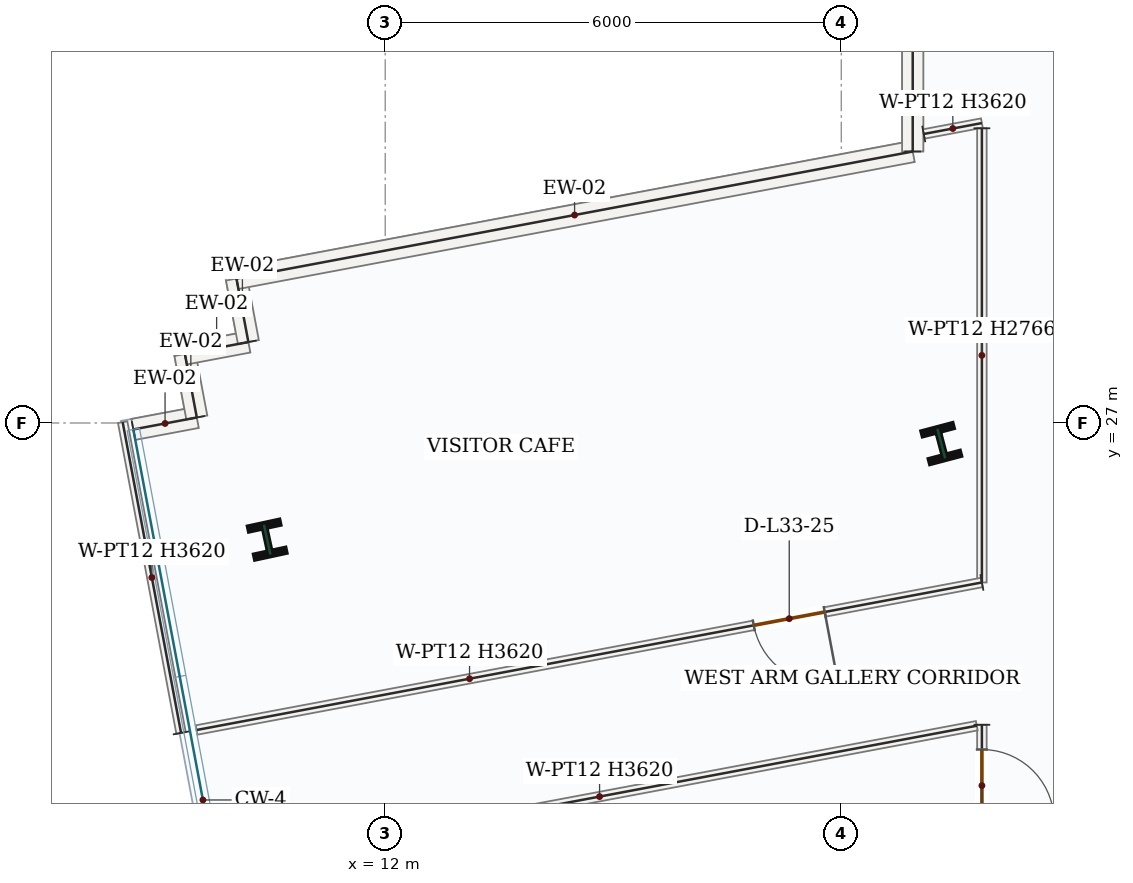
"""IFC4 building model, lengths in metres.
Left out: names, types, materials, properties, quantities, classifications, styles, units other than length and angle.
Written with IfcOpenShell. Run it as: python <this file> out.ifc"""

import sys

from ifc_helpers import new_model, si_unit, direction, frame, frame_2d, origin, origin_2d, place, context, subcontext, project, spatial, rectangle, i_section, extrude, source, transform, mapped, element, fill, save


model = new_model("IFC4")
c1 = context("Model", 3, precision=1e-05, world=origin(), true_north=direction((0.0, 1.0)))
c2 = subcontext(c1, "Body", "Model", "MODEL_VIEW")
j1 = project(units=[si_unit("LENGTHUNIT", "METRE"), si_unit("PLANEANGLEUNIT", "RADIAN")], contexts=[c1])
p1 = place(None, origin())
s1 = spatial("IfcSite", under=j1, at=p1, CompositionType="ELEMENT")
p2 = place(p1, origin())
s2 = spatial("IfcBuilding", under=s1, at=p2, CompositionType="ELEMENT")
p3 = place(p2, frame((0.0, 0.0, 147.3)))
s3 = spatial("IfcBuildingStorey", under=s2, at=p3, CompositionType="ELEMENT", Elevation=147.3)
m1 = source(origin(), c2, "Body", "SweptSolid", [
    extrude(i_section(OverallWidth=0.412, OverallDepth=0.435, WebThickness=0.036, FlangeThickness=0.057, FilletRadius=0.018, at=origin_2d()), origin(), (0.0, 0.0, 1.0), 3.9),
])
for number, where, z_axis, x_axis in (
    (1, (19.316, 26.729, 0.0), (0.0, 0.0, 1.0), (0.967, 0.255, 0.0)),
    (2, (10.447, 25.465, 0.0), (0.0, 0.0, 1.0), (0.977, 0.211, 0.0)),
):
    element("IfcColumn", number, at=place(p3, frame(where, z_axis=z_axis, x_axis=x_axis)), inside=s3, PredefinedType="COLUMN", context=c2, shape_type="MappedRepresentation", body=[
        mapped(m1, transform((0.0, 0.0, 0.0), x_axis=(1.0, 0.0, 0.0), y_axis=(0.0, 1.0, 0.0), z_axis=(0.0, 0.0, 1.0), scale=1.0)),
    ])
m2 = source(origin(), c2, "Body", "SweptSolid", [
    extrude(rectangle(XDim=0.85, YDim=0.28, at=frame_2d((0.425, 0.0))), origin(), (0.0, 0.0, 1.0), 3.62),
])
for number, where, z_axis, x_axis in (
    (3, (8.686, 26.915, 0.0), (0.0, 0.0, 1.0), (0.983, 0.185, 0.0)),
    (4, (9.521, 27.072, 0.0), (0.0, 0.0, 1.0), (-0.185, 0.983, 0.0)),
):
    element("IfcWall", number, at=place(p3, frame(where, z_axis=z_axis, x_axis=x_axis)), inside=s3, PredefinedType="SOLIDWALL", context=c2, shape_type="MappedRepresentation", body=[
        mapped(m2, transform((0.0, 0.0, 0.0), x_axis=(1.0, 0.0, 0.0), y_axis=(0.0, 1.0, 0.0), z_axis=(0.0, 0.0, 1.0), scale=1.0)),
    ])
m3 = source(origin(), c2, "Body", "SweptSolid", [
    extrude(rectangle(XDim=0.85, YDim=0.28, at=frame_2d((0.425, 0.0))), origin(), (0.0, 0.0, 1.0), 3.62),
])
p4 = place(p3, frame((9.365, 27.908, 0.0), z_axis=(0.0, 0.0, 1.0), x_axis=(0.982790785128, 0.184722149909, 0.0)))
e5 = element("IfcWall", 5, at=p4, inside=s3, PredefinedType="SOLIDWALL", context=c2, shape_type="MappedRepresentation", body=[
    mapped(m3, transform((0.0, 0.0, 0.0), x_axis=(1.0, 0.0, 0.0), y_axis=(0.0, 1.0, 0.0), z_axis=(0.0, 0.0, 1.0), scale=1.0)),
])
p5 = place(p3, frame((10.2, 28.065, 0.0), z_axis=(0.0, 0.0, 1.0), x_axis=(-0.184392582027, 0.982852672425, 0.0)))
e6 = element("IfcWall", 6, at=p5, inside=s3, PredefinedType="SOLIDWALL", context=c2, shape_type="MappedRepresentation", body=[
    mapped(m2, transform((0.0, 0.0, 0.0), x_axis=(1.0, 0.0, 0.0), y_axis=(0.0, 1.0, 0.0), z_axis=(0.0, 0.0, 1.0), scale=1.0)),
])
m4 = source(origin(), c2, "Body", "SweptSolid", [
    extrude(rectangle(XDim=9.052, YDim=0.28, at=frame_2d((4.526, 0.0))), origin(), (0.0, 0.0, 1.0), 3.62),
])
p6 = place(p3, frame((10.043, 28.9, 0.0), z_axis=(0.0, 0.0, 1.0), x_axis=(0.982808012228, 0.184630471755, 0.0)))
e7 = element("IfcWall", 7, at=p6, inside=s3, PredefinedType="SOLIDWALL", context=c2, shape_type="MappedRepresentation", body=[
    mapped(m4, transform((0.0, 0.0, 0.0), x_axis=(1.0, 0.0, 0.0), y_axis=(0.0, 1.0, 0.0), z_axis=(0.0, 0.0, 1.0), scale=1.0)),
])
m5 = source(origin(), c2, "Body", "SweptSolid", [
    extrude(rectangle(XDim=4.97, YDim=0.28, at=frame_2d((2.485, 0.0))), origin(), (0.0, 0.0, 1.0), 3.62),
])
p7 = place(p3, frame((18.94, 30.572, 0.0), z_axis=(0.0, 0.0, 1.0), x_axis=(0.0, 1.0, 0.0)))
e8 = element("IfcWall", 8, at=p7, inside=s3, PredefinedType="SOLIDWALL", context=c2, shape_type="MappedRepresentation", body=[
    mapped(m5, transform((0.0, 0.0, 0.0), x_axis=(1.0, 0.0, 0.0), y_axis=(0.0, 1.0, 0.0), z_axis=(0.0, 0.0, 1.0), scale=1.0)),
])
m6 = source(origin(), c2, "Body", "SweptSolid", [
    extrude(rectangle(XDim=4.16, YDim=0.125, at=frame_2d((2.08, 0.0))), origin(), (0.0, 0.0, 1.0), 3.62),
])
p8 = place(p3, frame((9.314, 22.923, 0.0), z_axis=(0.0, 0.0, 1.0), x_axis=(-0.184635785614, 0.982807013951, 0.0)))
e9 = element("IfcWall", 9, at=p8, inside=s3, PredefinedType="PARTITIONING", context=c2, shape_type="MappedRepresentation", body=[
    mapped(m6, transform((0.0, 0.0, 0.0), x_axis=(1.0, 0.0, 0.0), y_axis=(0.0, 1.0, 0.0), z_axis=(0.0, 0.0, 1.0), scale=1.0)),
])
m7 = source(origin(), c2, "Body", "SweptSolid", [
    extrude(rectangle(XDim=0.779, YDim=0.125, at=frame_2d((0.389, 0.0))), origin(), (0.0, 0.0, 1.0), 3.62),
])
p9 = place(p3, frame((19.085, 30.802, 0.0), z_axis=(0.0, 0.0, 1.0), x_axis=(0.982850878619, 0.184402143149, 0.0)))
e10 = element("IfcWall", 10, at=p9, inside=s3, PredefinedType="PARTITIONING", context=c2, shape_type="MappedRepresentation", body=[
    mapped(m7, transform((0.0, 0.0, 0.0), x_axis=(1.0, 0.0, 0.0), y_axis=(0.0, 1.0, 0.0), z_axis=(0.0, 0.0, 1.0), scale=1.0)),
])
m8 = source(origin(), c2, "Body", "SweptSolid", [
    extrude(rectangle(XDim=5.975, YDim=0.125, at=frame_2d((2.988, 0.0))), origin(), (0.0, 0.0, 1.0), 2.766),
])
p10 = place(p3, frame((19.85, 30.877, 0.0), z_axis=(0.0, 0.0, 1.0), x_axis=(0.0, -1.0, 0.0)))
e11 = element("IfcWall", 11, at=p10, inside=s3, PredefinedType="PARTITIONING", context=c2, shape_type="MappedRepresentation", body=[
    mapped(m8, transform((0.0, 0.0, 0.0), x_axis=(1.0, 0.0, 0.0), y_axis=(0.0, 1.0, 0.0), z_axis=(0.0, 0.0, 1.0), scale=1.0)),
])
p11 = place(p3, frame((19.85, 24.902, 0.0), z_axis=(0.0, 0.0, 1.0), x_axis=(-0.982804817995, -0.184647474194, 0.0)))
e12 = element("IfcWall", 12, at=p11, inside=s3, PredefinedType="PARTITIONING", context=c2, shape_type="SweptSolid", body=[
    extrude(rectangle(XDim=10.513, YDim=0.125, at=frame_2d((5.256, 0.0))), origin(), (0.0, 0.0, 1.0), 3.62),
])
p12 = place(p11, frame((2.104, 0.0, 0.0)))
e13 = element("IfcOpeningElement", 13, at=p12, cuts=e12, PredefinedType="OPENING", context=c2, shape_type="SweptSolid", body=[
    extrude(rectangle(XDim=0.95, YDim=2.15, at=frame_2d((0.475, 1.075))), frame((0.0, 0.073, 0.0), z_axis=(0.0, -1.0, 0.0), x_axis=(1.0, 0.0, 0.0)), (0.0, 0.0, 1.0), 0.145),
])
p13 = place(p3, frame((19.85, 23.03, 0.0), z_axis=(0.0, 0.0, 1.0), x_axis=(0.00040209084, -0.999999919161, 0.0)))
e14 = element("IfcWall", 14, at=p13, inside=s3, PredefinedType="PARTITIONING", context=c2, shape_type="SweptSolid", body=[
    extrude(rectangle(XDim=2.429, YDim=0.125, at=frame_2d((1.214, 0.0))), origin(), (0.0, 0.0, 1.0), 3.149),
])
p14 = place(p13, frame((0.325, 0.0, 0.0)))
e15 = element("IfcOpeningElement", 15, at=p14, cuts=e14, PredefinedType="OPENING", context=c2, shape_type="SweptSolid", body=[
    extrude(rectangle(XDim=0.95, YDim=2.15, at=frame_2d((0.475, 1.075))), frame((0.0, 0.073, 0.0), z_axis=(0.0, -1.0, 0.0), x_axis=(1.0, 0.0, 0.0)), (0.0, 0.0, 1.0), 0.145),
])
m9 = source(origin(), c2, "Body", "SweptSolid", [
    extrude(rectangle(XDim=10.098, YDim=0.125, at=frame_2d((5.049, 0.0))), origin(), (0.0, 0.0, 1.0), 3.62),
])
p15 = place(p3, frame((9.858, 21.153, 0.0), z_axis=(0.0, 0.0, 1.0), x_axis=(0.982807535277, 0.1846330106, 0.0)))
e16 = element("IfcWall", 16, at=p15, inside=s3, PredefinedType="PARTITIONING", context=c2, shape_type="MappedRepresentation", body=[
    mapped(m9, transform((0.0, 0.0, 0.0), x_axis=(1.0, 0.0, 0.0), y_axis=(0.0, 1.0, 0.0), z_axis=(0.0, 0.0, 1.0), scale=1.0)),
])
m10 = source(origin(), c2, "Body", "SweptSolid", [
    extrude(rectangle(XDim=0.95, YDim=2.15, at=frame_2d((0.475, 1.075))), frame((0.0, 0.025, 0.0), z_axis=(0.0, -1.0, 0.0), x_axis=(1.0, 0.0, 0.0)), (0.0, 0.0, 1.0), 0.05),
])
p16 = place(p12, origin())
e17 = element("IfcDoor", 17, at=p16, inside=s3, OperationType="SINGLE_SWING_LEFT", PredefinedType="DOOR", context=c2, shape_type="MappedRepresentation", body=[
    mapped(m10, transform((0.0, 0.0, 0.0), x_axis=(1.0, 0.0, 0.0), y_axis=(0.0, 1.0, 0.0), z_axis=(0.0, 0.0, 1.0), scale=1.0)),
])
fill(e13, e17)
p17 = place(p14, origin())
e18 = element("IfcDoor", 18, at=p17, inside=s3, OperationType="SINGLE_SWING_RIGHT", PredefinedType="DOOR", context=c2, shape_type="MappedRepresentation", body=[
    mapped(m10, transform((0.0, 0.0, 0.0), x_axis=(1.0, 0.0, 0.0), y_axis=(0.0, 1.0, 0.0), z_axis=(0.0, 0.0, 1.0), scale=1.0)),
])
fill(e15, e18)
save(model, sys.argv[1])
